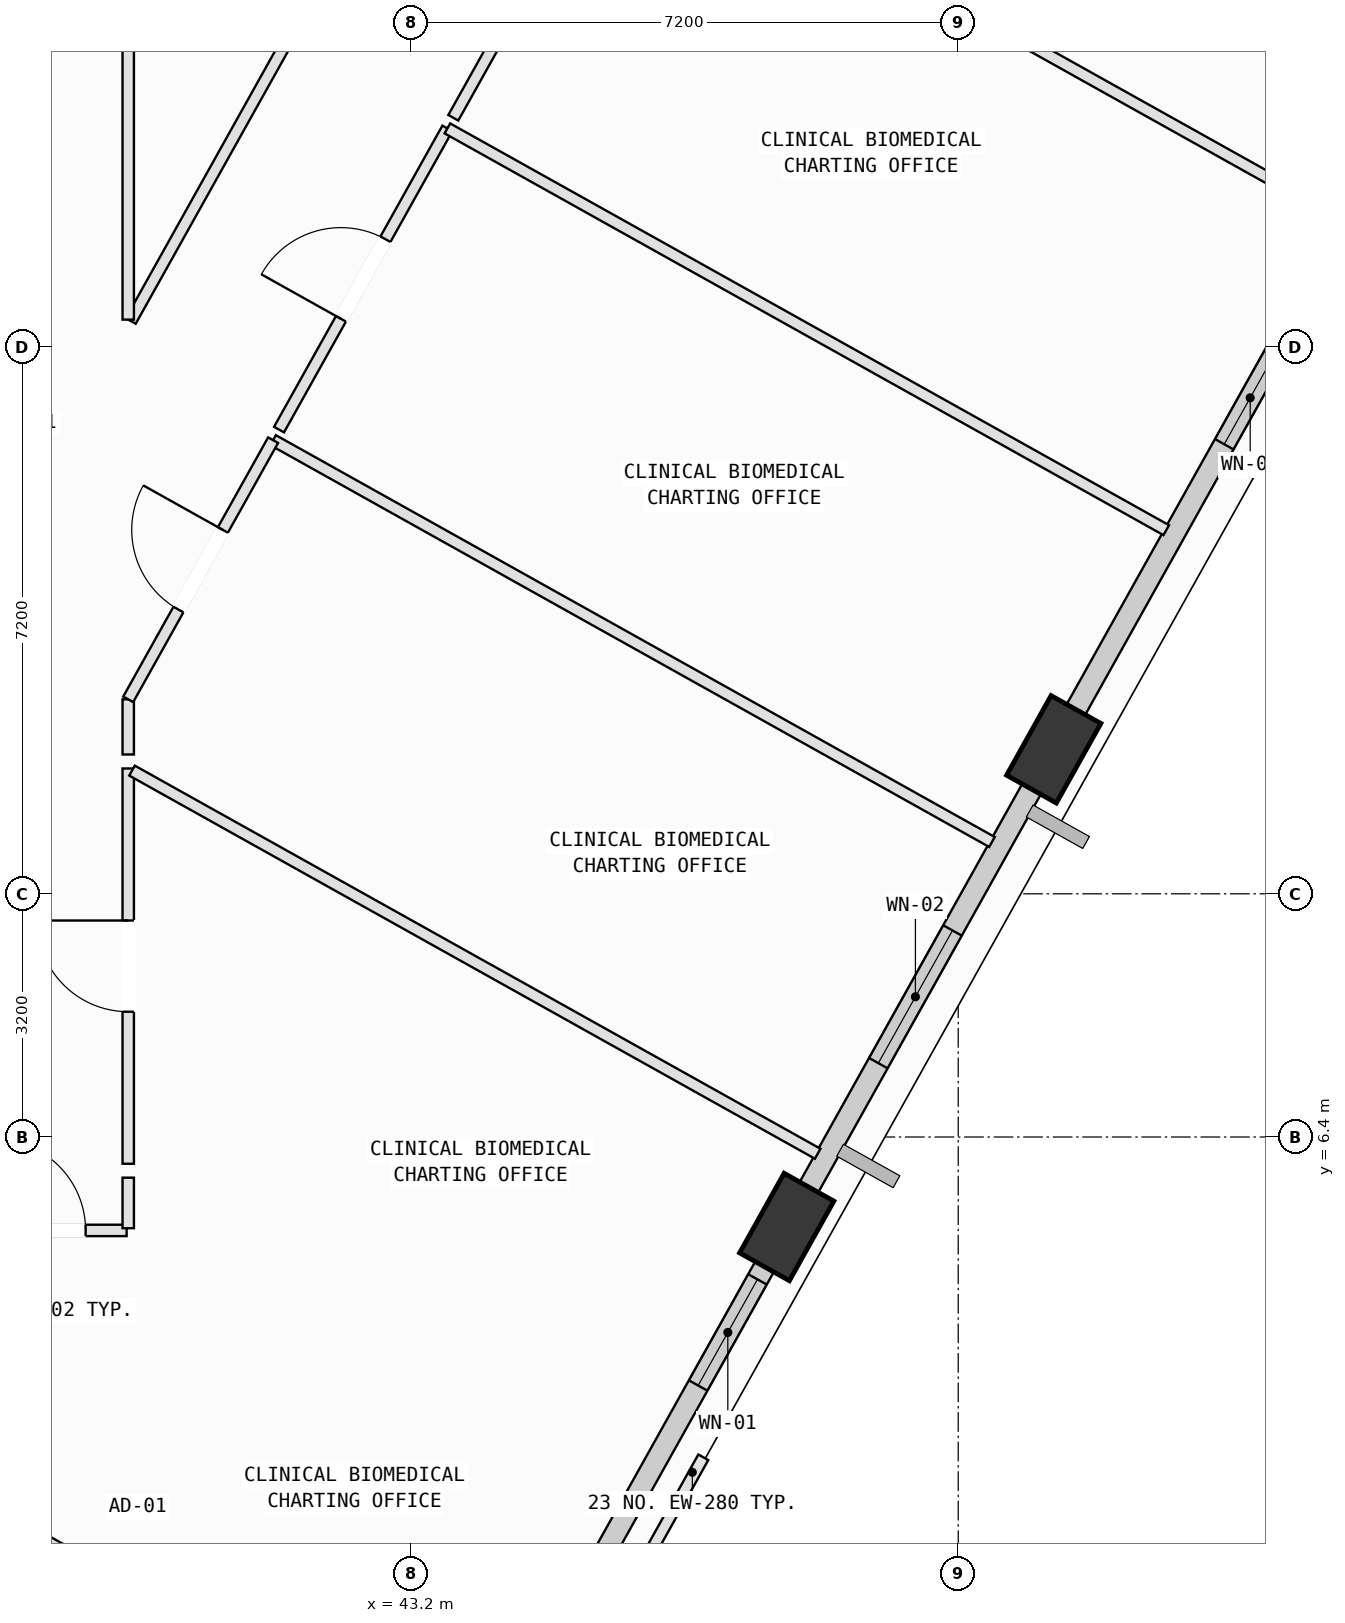
"""IFC4 building model, lengths in metres.
Left out: names, types, materials, properties, quantities, classifications, styles, units other than length and angle.
Written with IfcOpenShell. Run it as: python <this file> out.ifc"""

import sys

from ifc_helpers import new_model, si_unit, direction, frame, frame_2d, origin, origin_2d, place, context, subcontext, project, spatial, rectangle, extrude, element, fill, save


model = new_model("IFC4")
c1 = context("Model", 3, precision=1e-05, world=origin(), true_north=direction((0.0, 1.0)))
c2 = subcontext(c1, "Body", "Model", "MODEL_VIEW")
j1 = project(units=[si_unit("LENGTHUNIT", "METRE"), si_unit("PLANEANGLEUNIT", "RADIAN")], contexts=[c1])
p1 = place(None, origin())
s1 = spatial("IfcSite", under=j1, at=p1, CompositionType="ELEMENT")
p2 = place(p1, origin())
s2 = spatial("IfcBuilding", under=s1, at=p2, CompositionType="ELEMENT")
p3 = place(p2, frame((0.0, 0.0, 284.6)))
s3 = spatial("IfcBuildingStorey", under=s2, at=p3, CompositionType="ELEMENT", Elevation=284.6)
p4 = place(p3, frame((48.144, 5.216, 0.002), z_axis=(0.080291682271, 0.06065942385, 0.994923956921), x_axis=(-0.987044357458, -0.134265602345, 0.087841814854)))
e1 = element("IfcColumn", 1, at=p4, inside=s3, PredefinedType="COLUMN", context=c2, shape_type="SweptSolid", body=[
    extrude(rectangle(XDim=1.2, YDim=0.75, at=origin_2d()), origin(), (0.0, 0.0, 1.0), 4.017),
])
p5 = place(p3, frame((51.656, 11.501, 0.002), z_axis=(0.054319910646, 0.075001623546, 0.995702819004), x_axis=(-0.904946050869, -0.417777300156, 0.080837939674)))
e2 = element("IfcColumn", 2, at=p5, inside=s3, PredefinedType="COLUMN", context=c2, shape_type="SweptSolid", body=[
    extrude(rectangle(XDim=1.2, YDim=0.75, at=origin_2d()), origin(), (0.0, 0.0, 1.0), 4.014),
])
p6 = place(p3, frame((48.044, 5.038, 0.0), z_axis=(0.0, 0.0, 1.0), x_axis=(-0.487859600655, -0.872922109955, 0.0)))
e3 = element("IfcWall", 3, at=p6, inside=s3, PredefinedType="SOLIDWALL", context=c2, shape_type="SweptSolid", body=[
    extrude(rectangle(XDim=6.438, YDim=0.28, at=frame_2d((3.219, 0.0))), origin(), (0.0, 0.0, 1.0), 3.265),
])
p7 = place(p6, frame((0.585, 0.0, 0.75)))
e4 = element("IfcOpeningElement", 4, at=p7, cuts=e3, PredefinedType="OPENING", context=c2, shape_type="SweptSolid", body=[
    extrude(rectangle(XDim=1.6, YDim=1.95, at=frame_2d((0.8, 0.975))), frame((0.0, 0.15, 0.0), z_axis=(0.0, -1.0, 0.0), x_axis=(1.0, 0.0, 0.0)), (0.0, 0.0, 1.0), 0.3),
])
p8 = place(p3, frame((51.553, 11.316, 0.0), z_axis=(0.0, 0.0, 1.0), x_axis=(-0.487868282158, -0.872917257971, 0.0)))
e5 = element("IfcWall", 5, at=p8, inside=s3, PredefinedType="SOLIDWALL", context=c2, shape_type="SweptSolid", body=[
    extrude(rectangle(XDim=6.413, YDim=0.28, at=frame_2d((3.207, 0.0))), origin(), (0.0, 0.0, 1.0), 3.265),
])
p9 = place(p8, frame((2.518, 0.0, 0.75)))
e6 = element("IfcOpeningElement", 6, at=p9, cuts=e5, PredefinedType="OPENING", context=c2, shape_type="SweptSolid", body=[
    extrude(rectangle(XDim=2.0, YDim=1.95, at=frame_2d((1.0, 0.975))), frame((0.0, 0.15, 0.0), z_axis=(0.0, -1.0, 0.0), x_axis=(1.0, 0.0, 0.0)), (0.0, 0.0, 1.0), 0.3),
])
p10 = place(p3, frame((55.066, 17.601, 0.0), z_axis=(0.0, 0.0, 1.0), x_axis=(-0.487864059298, -0.872919618089, 0.0)))
e7 = element("IfcWall", 7, at=p10, inside=s3, PredefinedType="SOLIDWALL", context=c2, shape_type="SweptSolid", body=[
    extrude(rectangle(XDim=6.407, YDim=0.28, at=frame_2d((3.204, 0.0))), origin(), (0.0, 0.0, 1.0), 3.265),
])
p11 = place(p10, frame((0.99, 0.0, 0.75)))
e8 = element("IfcOpeningElement", 8, at=p11, cuts=e7, PredefinedType="OPENING", context=c2, shape_type="SweptSolid", body=[
    extrude(rectangle(XDim=1.4, YDim=1.85, at=frame_2d((0.7, 0.925))), frame((0.0, 0.15, 0.0), z_axis=(0.0, -1.0, 0.0), x_axis=(1.0, 0.0, 0.0)), (0.0, 0.0, 1.0), 0.3),
])
p12 = place(p3, frame((34.507, 3.26, 0.0), z_axis=(0.0, 0.0, 1.0), x_axis=(0.872922597233, -0.487858728774, 0.0)))
e9 = element("IfcWall", 9, at=p12, inside=s3, PredefinedType="PARTITIONING", context=c2, shape_type="SweptSolid", body=[
    extrude(rectangle(XDim=10.835, YDim=0.15, at=frame_2d((5.417, 0.0))), origin(), (0.0, 0.0, 1.0), 3.78),
])
p13 = place(p12, frame((4.988, 0.0, 0.0)))
e10 = element("IfcOpeningElement", 10, at=p13, cuts=e9, PredefinedType="OPENING", context=c2, shape_type="SweptSolid", body=[
    extrude(rectangle(XDim=0.86, YDim=2.06, at=frame_2d((0.43, 1.03))), frame((0.0, 0.085, 0.0), z_axis=(0.0, -1.0, 0.0), x_axis=(1.0, 0.0, 0.0)), (0.0, 0.0, 1.0), 0.17),
])
p14 = place(p3, frame((37.18, 5.17, 0.0), z_axis=(0.0, 0.0, 1.0), x_axis=(0.999999908196, 0.000428494872, 0.0)))
e11 = element("IfcWall", 11, at=p14, inside=s3, PredefinedType="PARTITIONING", context=c2, shape_type="SweptSolid", body=[
    extrude(rectangle(XDim=2.279, YDim=0.15, at=frame_2d((1.14, 0.0))), origin(), (0.0, 0.0, 1.0), 3.78),
])
p15 = place(p14, frame((0.54, 0.0, 0.0)))
e12 = element("IfcOpeningElement", 12, at=p15, cuts=e11, PredefinedType="OPENING", context=c2, shape_type="SweptSolid", body=[
    extrude(rectangle(XDim=1.2, YDim=2.15, at=frame_2d((0.6, 1.075))), frame((0.0, 0.085, 0.0), z_axis=(0.0, -1.0, 0.0), x_axis=(1.0, 0.0, 0.0)), (0.0, 0.0, 1.0), 0.17),
])
p16 = place(p3, frame((39.48, 5.2, 0.0), z_axis=(0.0, 0.0, 1.0), x_axis=(0.0, 1.0, 0.0)))
e13 = element("IfcWall", 13, at=p16, inside=s3, PredefinedType="PARTITIONING", context=c2, shape_type="SweptSolid", body=[
    extrude(rectangle(XDim=0.665, YDim=0.15, at=frame_2d((0.333, 0.0))), origin(), (0.0, 0.0, 1.0), 3.78),
])
p17 = place(p3, frame((48.625, 5.605, 0.0), z_axis=(0.0, 0.0, 1.0), x_axis=(-0.488278447014, -0.872687892767, 0.0)))
e14 = element("IfcWall", 14, at=p17, inside=s3, PredefinedType="PARTITIONING", context=c2, shape_type="SweptSolid", body=[
    extrude(rectangle(XDim=0.778, YDim=0.15, at=frame_2d((0.389, 0.0))), origin(), (0.0, 0.0, 1.0), 3.265),
])
p18 = place(p3, frame((39.48, 6.048, 0.0), z_axis=(0.0, 0.0, 1.0), x_axis=(0.0, 1.0, 0.0)))
e15 = element("IfcWall", 15, at=p18, inside=s3, PredefinedType="PARTITIONING", context=c2, shape_type="SweptSolid", body=[
    extrude(rectangle(XDim=5.201, YDim=0.15, at=frame_2d((2.601, 0.0))), origin(), (0.0, 0.0, 1.0), 3.78),
])
p19 = place(p18, frame((2.0, 0.0, 0.0)))
e16 = element("IfcOpeningElement", 16, at=p19, cuts=e15, PredefinedType="OPENING", context=c2, shape_type="SweptSolid", body=[
    extrude(rectangle(XDim=1.2, YDim=2.15, at=frame_2d((0.6, 1.075))), frame((0.0, 0.085, 0.0), z_axis=(0.0, -1.0, 0.0), x_axis=(1.0, 0.0, 0.0)), (0.0, 0.0, 1.0), 0.17),
])
p20 = place(p3, frame((39.53, 11.221, 0.0), z_axis=(0.0, 0.0, 1.0), x_axis=(0.872948808253, -0.487811826598, 0.0)))
e17 = element("IfcWall", 17, at=p20, inside=s3, PredefinedType="PARTITIONING", context=c2, shape_type="SweptSolid", body=[
    extrude(rectangle(XDim=10.334, YDim=0.15, at=frame_2d((5.167, 0.0))), origin(), (0.0, 0.0, 1.0), 3.78),
])
p21 = place(p3, frame((41.386, 15.569, 0.0), z_axis=(0.0, 0.0, 1.0), x_axis=(0.872874616124, -0.487944571161, 0.0)))
e18 = element("IfcWall", 18, at=p21, inside=s3, PredefinedType="PARTITIONING", context=c2, shape_type="SweptSolid", body=[
    extrude(rectangle(XDim=10.835, YDim=0.15, at=frame_2d((5.418, 0.0))), origin(), (0.0, 0.0, 1.0), 3.78),
])
p22 = place(p3, frame((39.48, 11.433, 0.0), z_axis=(0.0, 0.0, 1.0), x_axis=(0.0, 1.0, 0.0)))
e19 = element("IfcWall", 19, at=p22, inside=s3, PredefinedType="PARTITIONING", context=c2, shape_type="SweptSolid", body=[
    extrude(rectangle(XDim=0.726, YDim=0.15, at=frame_2d((0.363, 0.0))), origin(), (0.0, 0.0, 1.0), 3.315),
])
p23 = place(p3, frame((39.48, 12.159, 0.0), z_axis=(0.0, 0.0, 1.0), x_axis=(0.487885785895, 0.872907475006, 0.0)))
e20 = element("IfcWall", 20, at=p23, inside=s3, PredefinedType="PARTITIONING", context=c2, shape_type="SweptSolid", body=[
    extrude(rectangle(XDim=3.907, YDim=0.15, at=frame_2d((1.953, 0.0))), origin(), (0.0, 0.0, 1.0), 3.78),
])
p24 = place(p23, frame((1.353, 0.0, 0.0)))
e21 = element("IfcOpeningElement", 21, at=p24, cuts=e20, PredefinedType="OPENING", context=c2, shape_type="SweptSolid", body=[
    extrude(rectangle(XDim=1.2, YDim=2.15, at=frame_2d((0.6, 1.075))), frame((0.0, 0.085, 0.0), z_axis=(0.0, -1.0, 0.0), x_axis=(1.0, 0.0, 0.0)), (0.0, 0.0, 1.0), 0.17),
])
p25 = place(p3, frame((41.464, 15.708, 0.0), z_axis=(0.0, 0.0, 1.0), x_axis=(0.487869568795, 0.872916538876, 0.0)))
e22 = element("IfcWall", 22, at=p25, inside=s3, PredefinedType="PARTITIONING", context=c2, shape_type="SweptSolid", body=[
    extrude(rectangle(XDim=4.54, YDim=0.15, at=frame_2d((2.27, 0.0))), origin(), (0.0, 0.0, 1.0), 3.78),
])
p26 = place(p25, frame((1.67, 0.0, 0.0)))
e23 = element("IfcOpeningElement", 23, at=p26, cuts=e22, PredefinedType="OPENING", context=c2, shape_type="SweptSolid", body=[
    extrude(rectangle(XDim=1.2, YDim=2.15, at=frame_2d((0.6, 1.075))), frame((0.0, 0.085, 0.0), z_axis=(0.0, -1.0, 0.0), x_axis=(1.0, 0.0, 0.0)), (0.0, 0.0, 1.0), 0.17),
])
p27 = place(p3, frame((43.679, 19.671, 0.0), z_axis=(0.0, 0.0, 1.0), x_axis=(0.872922597233, -0.487858728774, 0.0)))
e24 = element("IfcWall", 24, at=p27, inside=s3, PredefinedType="PARTITIONING", context=c2, shape_type="SweptSolid", body=[
    extrude(rectangle(XDim=10.835, YDim=0.15, at=frame_2d((5.417, 0.0))), origin(), (0.0, 0.0, 1.0), 3.78),
])
p28 = place(p3, frame((52.141, 11.896, 0.0), z_axis=(0.0, 0.0, 1.0), x_axis=(-0.487704188901, -0.873008948481, 0.0)))
e25 = element("IfcWall", 25, at=p28, inside=s3, PredefinedType="PARTITIONING", context=c2, shape_type="SweptSolid", body=[
    extrude(rectangle(XDim=0.794, YDim=0.15, at=frame_2d((0.397, 0.0))), origin(), (0.0, 0.0, 1.0), 3.265),
])
p29 = place(p3, frame((43.757, 19.811, 0.0), z_axis=(0.0, 0.0, 1.0), x_axis=(0.487869568795, 0.872916538876, 0.0)))
e26 = element("IfcWall", 26, at=p29, inside=s3, PredefinedType="PARTITIONING", context=c2, shape_type="SweptSolid", body=[
    extrude(rectangle(XDim=4.54, YDim=0.15, at=frame_2d((2.27, 0.0))), origin(), (0.0, 0.0, 1.0), 3.78),
])
p30 = place(p29, frame((1.67, 0.0, 0.0)))
e27 = element("IfcOpeningElement", 27, at=p30, cuts=e26, PredefinedType="OPENING", context=c2, shape_type="SweptSolid", body=[
    extrude(rectangle(XDim=1.2, YDim=2.15, at=frame_2d((0.6, 1.075))), frame((0.0, 0.085, 0.0), z_axis=(0.0, -1.0, 0.0), x_axis=(1.0, 0.0, 0.0)), (0.0, 0.0, 1.0), 0.17),
])
p31 = place(p3, frame((45.972, 23.774, 0.0), z_axis=(0.0, 0.0, 1.0), x_axis=(0.872922597233, -0.487858728774, 0.0)))
e28 = element("IfcWall", 28, at=p31, inside=s3, PredefinedType="PARTITIONING", context=c2, shape_type="SweptSolid", body=[
    extrude(rectangle(XDim=10.835, YDim=0.15, at=frame_2d((5.417, 0.0))), origin(), (0.0, 0.0, 1.0), 3.78),
])
p32 = place(p3, frame((42.509, 22.499, 0.0), z_axis=(0.0, 0.0, 1.0), x_axis=(-0.487777705872, -0.872967874354, 0.0)))
e29 = element("IfcWall", 29, at=p32, inside=s3, PredefinedType="PARTITIONING", context=c2, shape_type="SweptSolid", body=[
    extrude(rectangle(XDim=6.142, YDim=0.15, at=frame_2d((3.071, 0.0))), origin(), (0.0, 0.0, 1.0), 3.78),
])
p33 = place(p3, frame((39.48, 17.155, 0.0), z_axis=(0.0, 0.0, 1.0), x_axis=(0.0, 1.0, 0.0)))
e30 = element("IfcWall", 30, at=p33, inside=s3, PredefinedType="PARTITIONING", context=c2, shape_type="SweptSolid", body=[
    extrude(rectangle(XDim=3.698, YDim=0.15, at=frame_2d((1.849, 0.0))), origin(), (0.0, 0.0, 1.0), 3.78),
])
p34 = place(p3, frame((47.046, 2.186, 0.0), z_axis=(0.0, 0.0, 1.0), x_axis=(-0.487751512774, -0.872982509439, 0.0)))
e31 = element("IfcWall", 31, at=p34, inside=s3, PredefinedType="PARTITIONING", context=c2, shape_type="SweptSolid", body=[
    extrude(rectangle(XDim=6.189, YDim=0.15, at=frame_2d((3.095, 0.0))), origin(), (0.0, 0.0, 1.0), 3.265),
])
p35 = place(p7, origin())
e32 = element("IfcWindow", 32, at=p35, inside=s3, PartitioningType="SINGLE_PANEL", PredefinedType="WINDOW", context=c2, shape_type="SweptSolid", body=[
    extrude(rectangle(XDim=1.6, YDim=1.95, at=frame_2d((0.8, 0.975))), frame((0.0, 0.03, 0.0), z_axis=(0.0, -1.0, 0.0), x_axis=(1.0, 0.0, 0.0)), (0.0, 0.0, 1.0), 0.06),
])
fill(e4, e32)
p36 = place(p9, origin())
e33 = element("IfcWindow", 33, at=p36, inside=s3, PartitioningType="SINGLE_PANEL", PredefinedType="WINDOW", context=c2, shape_type="SweptSolid", body=[
    extrude(rectangle(XDim=2.0, YDim=1.95, at=frame_2d((1.0, 0.975))), frame((0.0, 0.03, 0.0), z_axis=(0.0, -1.0, 0.0), x_axis=(1.0, 0.0, 0.0)), (0.0, 0.0, 1.0), 0.06),
])
fill(e6, e33)
p37 = place(p11, origin())
e34 = element("IfcWindow", 34, at=p37, inside=s3, PartitioningType="SINGLE_PANEL", PredefinedType="WINDOW", context=c2, shape_type="SweptSolid", body=[
    extrude(rectangle(XDim=1.4, YDim=1.85, at=frame_2d((0.7, 0.925))), frame((0.0, 0.03, 0.0), z_axis=(0.0, -1.0, 0.0), x_axis=(1.0, 0.0, 0.0)), (0.0, 0.0, 1.0), 0.06),
])
fill(e8, e34)
p38 = place(p15, origin())
e35 = element("IfcDoor", 35, at=p38, inside=s3, OperationType="SINGLE_SWING_LEFT", PredefinedType="DOOR", context=c2, shape_type="SweptSolid", body=[
    extrude(rectangle(XDim=1.2, YDim=2.15, at=frame_2d((0.6, 1.075))), frame((0.0, 0.025, 0.0), z_axis=(0.0, -1.0, 0.0), x_axis=(1.0, 0.0, 0.0)), (0.0, 0.0, 1.0), 0.05),
])
fill(e12, e35)
p39 = place(p19, origin())
e36 = element("IfcDoor", 36, at=p39, inside=s3, OperationType="SINGLE_SWING_RIGHT", PredefinedType="DOOR", context=c2, shape_type="SweptSolid", body=[
    extrude(rectangle(XDim=1.2, YDim=2.15, at=frame_2d((0.6, 1.075))), frame((0.0, 0.025, 0.0), z_axis=(0.0, -1.0, 0.0), x_axis=(1.0, 0.0, 0.0)), (0.0, 0.0, 1.0), 0.05),
])
fill(e16, e36)
p40 = place(p24, origin())
e37 = element("IfcDoor", 37, at=p40, inside=s3, OperationType="SINGLE_SWING_RIGHT", PredefinedType="DOOR", context=c2, shape_type="SweptSolid", body=[
    extrude(rectangle(XDim=1.2, YDim=2.15, at=frame_2d((0.6, 1.075))), frame((0.0, 0.025, 0.0), z_axis=(0.0, -1.0, 0.0), x_axis=(1.0, 0.0, 0.0)), (0.0, 0.0, 1.0), 0.05),
])
fill(e21, e37)
p41 = place(p26, origin())
e38 = element("IfcDoor", 38, at=p41, inside=s3, OperationType="SINGLE_SWING_LEFT", PredefinedType="DOOR", context=c2, shape_type="SweptSolid", body=[
    extrude(rectangle(XDim=1.2, YDim=2.15, at=frame_2d((0.6, 1.075))), frame((0.0, 0.025, 0.0), z_axis=(0.0, -1.0, 0.0), x_axis=(1.0, 0.0, 0.0)), (0.0, 0.0, 1.0), 0.05),
])
fill(e23, e38)
save(model, sys.argv[1])
